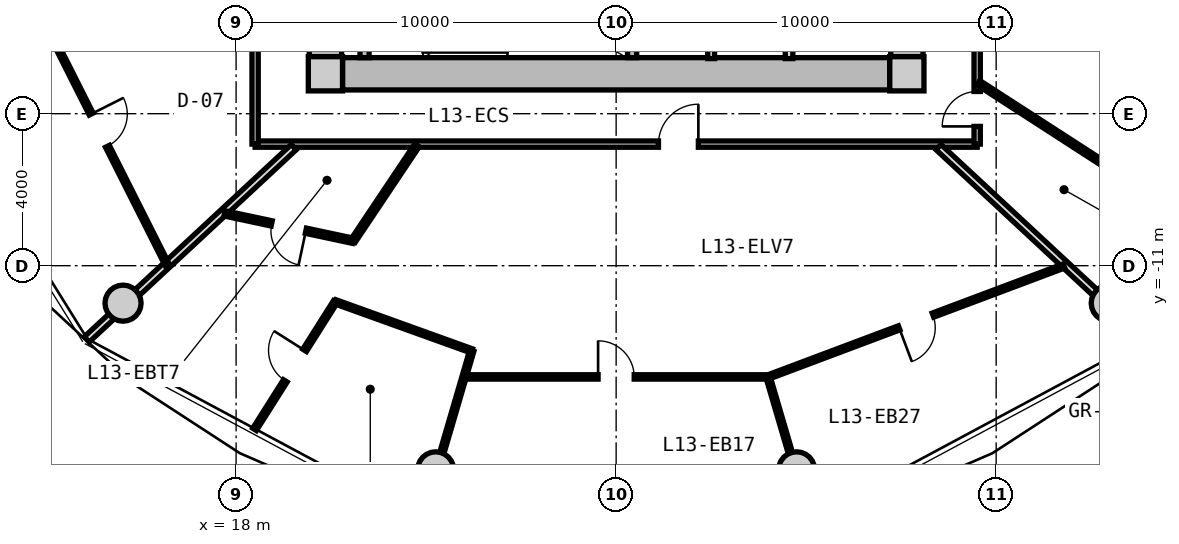
"""IFC4 building model, lengths in metres.
Left out: names, types, materials, properties, quantities, classifications, styles, units other than length and angle.
Written with IfcOpenShell. Run it as: python <this file> out.ifc"""

import sys

from ifc_helpers import new_model, si_unit, direction, frame, frame_2d, origin, origin_2d, place, context, subcontext, project, spatial, rectangle, circle, extrude, source, transform, mapped, element, fill, save


model = new_model("IFC4")
c1 = context("Model", 3, precision=1e-05, world=origin(), true_north=direction((0.0, 1.0)))
c2 = subcontext(c1, "Body", "Model", "MODEL_VIEW")
j1 = project(units=[si_unit("LENGTHUNIT", "METRE"), si_unit("PLANEANGLEUNIT", "RADIAN")], contexts=[c1])
p1 = place(None, origin())
s1 = spatial("IfcSite", under=j1, at=p1, CompositionType="ELEMENT")
p2 = place(p1, origin())
s2 = spatial("IfcBuilding", under=s1, at=p2, CompositionType="ELEMENT")
p3 = place(p2, frame((0.0, 0.0, 46.0)))
s3 = spatial("IfcBuildingStorey", under=s2, at=p3, CompositionType="ELEMENT", Elevation=46.0)
m1 = source(origin(), c2, "Body", "SweptSolid", [
    extrude(rectangle(XDim=0.9, YDim=0.9, at=origin_2d()), origin(), (0.0, 0.0, 1.0), 3.05),
])
for number, where, z_axis, x_axis in (
    (1, (20.35, -5.95, 0.0), (0.0, 0.0, 1.0), (1.0, 0.0, 0.0)),
    (2, (35.65, -5.95, 0.0), (0.0, 0.0, 1.0), (1.0, 0.0, 0.0)),
):
    element("IfcColumn", number, at=place(p3, frame(where, z_axis=z_axis, x_axis=x_axis)), inside=s3, PredefinedType="COLUMN", context=c2, shape_type="MappedRepresentation", body=[
        mapped(m1, transform((0.0, 0.0, 0.0), x_axis=(1.0, 0.0, 0.0), y_axis=(0.0, 1.0, 0.0), z_axis=(0.0, 0.0, 1.0), scale=1.0)),
    ])
m2 = source(origin(), c2, "Body", "SweptSolid", [
    extrude(rectangle(XDim=14.4, YDim=0.85, at=frame_2d((7.2, 0.0))), origin(), (0.0, 0.0, 1.0), 2.79),
])
p4 = place(p3, frame((35.2, -5.95, 0.0), z_axis=(0.0, 0.0, 1.0), x_axis=(-1.0, 0.0, 0.0)))
e3 = element("IfcWall", 3, at=p4, inside=s3, PredefinedType="SHEAR", context=c2, shape_type="MappedRepresentation", body=[
    mapped(m2, transform((0.0, 0.0, 0.0), x_axis=(1.0, 0.0, 0.0), y_axis=(0.0, 1.0, 0.0), z_axis=(0.0, 0.0, 1.0), scale=1.0)),
])
m3 = source(origin(), c2, "Body", "SweptSolid", [
    extrude(rectangle(XDim=11.0, YDim=0.85, at=frame_2d((5.5, 0.0))), origin(), (0.0, 0.0, 1.0), 2.79),
])
p5 = place(p3, frame((20.35, -5.5, 0.0), z_axis=(0.0, 0.0, 1.0), x_axis=(0.0, 1.0, 0.0)))
e4 = element("IfcWall", 4, at=p5, inside=s3, PredefinedType="SHEAR", context=c2, shape_type="MappedRepresentation", body=[
    mapped(m3, transform((0.0, 0.0, 0.0), x_axis=(1.0, 0.0, 0.0), y_axis=(0.0, 1.0, 0.0), z_axis=(0.0, 0.0, 1.0), scale=1.0)),
])
p6 = place(p5, frame((3.8, 0.0, 0.0)))
e5 = element("IfcOpeningElement", 5, at=p6, cuts=e4, PredefinedType="OPENING", context=c2, shape_type="SweptSolid", body=[
    extrude(rectangle(XDim=1.2, YDim=2.15, at=frame_2d((0.6, 1.075))), frame((0.0, 0.435, 0.0), z_axis=(0.0, -1.0, 0.0), x_axis=(1.0, 0.0, 0.0)), (0.0, 0.0, 1.0), 0.87),
])
p7 = place(p3, frame((35.65, 5.5, 0.0), z_axis=(0.0, 0.0, 1.0), x_axis=(0.0, -1.0, 0.0)))
e6 = element("IfcWall", 6, at=p7, inside=s3, PredefinedType="SHEAR", context=c2, shape_type="MappedRepresentation", body=[
    mapped(m3, transform((0.0, 0.0, 0.0), x_axis=(1.0, 0.0, 0.0), y_axis=(0.0, 1.0, 0.0), z_axis=(0.0, 0.0, 1.0), scale=1.0)),
])
p8 = place(p7, frame((5.65, 0.0, 0.0)))
e7 = element("IfcOpeningElement", 7, at=p8, cuts=e6, PredefinedType="OPENING", context=c2, shape_type="SweptSolid", body=[
    extrude(rectangle(XDim=1.2, YDim=2.15, at=frame_2d((0.6, 1.075))), frame((0.0, 0.435, 0.0), z_axis=(0.0, -1.0, 0.0), x_axis=(1.0, 0.0, 0.0)), (0.0, 0.0, 1.0), 0.87),
])
m4 = source(origin(), c2, "Body", "SweptSolid", [
    extrude(circle(Radius=0.475, at=origin_2d()), origin(), (0.0, 0.0, 1.0), 3.05),
])
for number, where, z_axis, x_axis in (
    (8, (15.025, -11.985, 0.0), (0.0, 0.0, 1.0), (1.0, 0.0, 0.0)),
    (9, (23.251, -16.373, 0.0), (0.0, 0.0, 1.0), (1.0, 0.0, 0.0)),
    (10, (32.749, -16.373, 0.0), (0.0, 0.0, 1.0), (1.0, 0.0, 0.0)),
    (11, (40.975, -11.985, 0.0), (0.0, 0.0, 1.0), (1.0, 0.0, 0.0)),
):
    element("IfcColumn", number, at=place(p3, frame(where, z_axis=z_axis, x_axis=x_axis)), inside=s3, PredefinedType="COLUMN", context=c2, shape_type="MappedRepresentation", body=[
        mapped(m4, transform((0.0, 0.0, 0.0), x_axis=(1.0, 0.0, 0.0), y_axis=(0.0, 1.0, 0.0), z_axis=(0.0, 0.0, 1.0), scale=1.0)),
    ])
m5 = source(origin(), c2, "Body", "SweptSolid", [
    extrude(rectangle(XDim=3.075, YDim=0.24, at=frame_2d((1.538, 0.0))), origin(), (0.0, 0.0, 1.0), 2.79),
])
for number, where, z_axis, x_axis in (
    (12, (21.38, -5.525, 0.0), (0.0, 0.0, 1.0), (0.0, 1.0, 0.0)),
    (13, (28.42, -5.525, 0.0), (0.0, 0.0, 1.0), (0.0, 1.0, 0.0)),
):
    element("IfcWall", number, at=place(p3, frame(where, z_axis=z_axis, x_axis=x_axis)), inside=s3, PredefinedType="PARTITIONING", context=c2, shape_type="MappedRepresentation", body=[
        mapped(m5, transform((0.0, 0.0, 0.0), x_axis=(1.0, 0.0, 0.0), y_axis=(0.0, 1.0, 0.0), z_axis=(0.0, 0.0, 1.0), scale=1.0)),
    ])
m6 = source(origin(), c2, "Body", "SweptSolid", [
    extrude(rectangle(XDim=3.8, YDim=0.2, at=frame_2d((1.9, 0.0))), origin(), (0.0, 0.0, 1.0), 2.775),
])
p9 = place(p3, frame((32.55, -5.55, 0.0), z_axis=(0.0, 0.0, 1.0), x_axis=(0.0, 1.0, 0.0)))
e14 = element("IfcWall", 14, at=p9, inside=s3, PredefinedType="PARTITIONING", context=c2, shape_type="MappedRepresentation", body=[
    mapped(m6, transform((0.0, 0.0, 0.0), x_axis=(1.0, 0.0, 0.0), y_axis=(0.0, 1.0, 0.0), z_axis=(0.0, 0.0, 1.0), scale=1.0)),
])
m7 = source(origin(), c2, "Body", "SweptSolid", [
    extrude(rectangle(XDim=3.22, YDim=0.18, at=frame_2d((1.61, 0.0))), origin(), (0.0, 0.0, 1.0), 2.775),
])
p10 = place(p3, frame((30.5, -5.55, 0.0), z_axis=(0.0, 0.0, 1.0), x_axis=(0.0, 1.0, 0.0)))
e15 = element("IfcWall", 15, at=p10, inside=s3, PredefinedType="PARTITIONING", context=c2, shape_type="MappedRepresentation", body=[
    mapped(m7, transform((0.0, 0.0, 0.0), x_axis=(1.0, 0.0, 0.0), y_axis=(0.0, 1.0, 0.0), z_axis=(0.0, 0.0, 1.0), scale=1.0)),
])
m8 = source(origin(), c2, "Body", "SweptSolid", [
    extrude(rectangle(XDim=19.0, YDim=0.165, at=frame_2d((9.5, 0.0))), origin(), (0.0, 0.0, 1.0), 2.775),
])
p11 = place(p3, frame((37.5, -7.8, 0.0), z_axis=(0.0, 0.0, 1.0), x_axis=(-1.0, 0.0, 0.0)))
e16 = element("IfcWall", 16, at=p11, inside=s3, PredefinedType="PARTITIONING", context=c2, shape_type="MappedRepresentation", body=[
    mapped(m8, transform((0.0, 0.0, 0.0), x_axis=(1.0, 0.0, 0.0), y_axis=(0.0, 1.0, 0.0), z_axis=(0.0, 0.0, 1.0), scale=1.0)),
])
p12 = place(p11, frame((7.336, 0.0, 0.0)))
e17 = element("IfcOpeningElement", 17, at=p12, cuts=e16, PredefinedType="OPENING", context=c2, shape_type="SweptSolid", body=[
    extrude(rectangle(XDim=1.05, YDim=2.15, at=frame_2d((0.525, 1.075))), frame((0.0, 0.093, 0.0), z_axis=(0.0, -1.0, 0.0), x_axis=(1.0, 0.0, 0.0)), (0.0, 0.0, 1.0), 0.185),
])
m9 = source(origin(), c2, "Body", "SweptSolid", [
    extrude(rectangle(XDim=15.6, YDim=0.165, at=frame_2d((7.8, 0.0))), origin(), (0.0, 0.0, 1.0), 2.775),
])
p13 = place(p3, frame((18.5, -7.8, 0.0), z_axis=(0.0, 0.0, 1.0), x_axis=(0.0, 1.0, 0.0)))
e18 = element("IfcWall", 18, at=p13, inside=s3, PredefinedType="PARTITIONING", context=c2, shape_type="MappedRepresentation", body=[
    mapped(m9, transform((0.0, 0.0, 0.0), x_axis=(1.0, 0.0, 0.0), y_axis=(0.0, 1.0, 0.0), z_axis=(0.0, 0.0, 1.0), scale=1.0)),
])
p14 = place(p13, frame((7.275, 0.0, 0.0)))
e19 = element("IfcOpeningElement", 19, at=p14, cuts=e18, PredefinedType="OPENING", context=c2, shape_type="SweptSolid", body=[
    extrude(rectangle(XDim=1.05, YDim=2.15, at=frame_2d((0.525, 1.075))), frame((0.0, 0.093, 0.0), z_axis=(0.0, -1.0, 0.0), x_axis=(1.0, 0.0, 0.0)), (0.0, 0.0, 1.0), 0.185),
])
p15 = place(p3, frame((37.5, 7.8, 0.0), z_axis=(0.0, 0.0, 1.0), x_axis=(0.0, -1.0, 0.0)))
e20 = element("IfcWall", 20, at=p15, inside=s3, PredefinedType="PARTITIONING", context=c2, shape_type="MappedRepresentation", body=[
    mapped(m9, transform((0.0, 0.0, 0.0), x_axis=(1.0, 0.0, 0.0), y_axis=(0.0, 1.0, 0.0), z_axis=(0.0, 0.0, 1.0), scale=1.0)),
])
p16 = place(p15, frame((14.215, 0.0, 0.0)))
e21 = element("IfcOpeningElement", 21, at=p16, cuts=e20, PredefinedType="OPENING", context=c2, shape_type="SweptSolid", body=[
    extrude(rectangle(XDim=0.92, YDim=2.1, at=frame_2d((0.46, 1.05))), frame((0.0, 0.093, 0.0), z_axis=(0.0, -1.0, 0.0), x_axis=(1.0, 0.0, 0.0)), (0.0, 0.0, 1.0), 0.185),
])
p17 = place(p15, frame((11.609, 0.0, 0.0)))
e22 = element("IfcOpeningElement", 22, at=p17, cuts=e20, PredefinedType="OPENING", context=c2, shape_type="SweptSolid", body=[
    extrude(rectangle(XDim=0.92, YDim=2.1, at=frame_2d((0.46, 1.05))), frame((0.0, 0.093, 0.0), z_axis=(0.0, -1.0, 0.0), x_axis=(1.0, 0.0, 0.0)), (0.0, 0.0, 1.0), 0.185),
])
p18 = place(p15, frame((7.175, 0.0, 0.0)))
e23 = element("IfcOpeningElement", 23, at=p18, cuts=e20, PredefinedType="OPENING", context=c2, shape_type="SweptSolid", body=[
    extrude(rectangle(XDim=1.25, YDim=2.2, at=frame_2d((0.625, 1.1))), frame((0.0, 0.093, 0.0), z_axis=(0.0, -1.0, 0.0), x_axis=(1.0, 0.0, 0.0)), (0.0, 0.0, 1.0), 0.185),
])
m10 = source(origin(), c2, "Body", "SweptSolid", [
    extrude(rectangle(XDim=7.435, YDim=0.19, at=frame_2d((3.717, 0.0))), origin(), (0.0, 0.0, 1.0), 2.225),
])
p19 = place(p3, frame((19.517, -7.88, 0.0), z_axis=(0.0, 0.0, 1.0), x_axis=(-0.732651956848, -0.680603489652, 0.0)))
e24 = element("IfcWall", 24, at=p19, inside=s3, PredefinedType="PARTITIONING", context=c2, shape_type="MappedRepresentation", body=[
    mapped(m10, transform((0.0, 0.0, 0.0), x_axis=(1.0, 0.0, 0.0), y_axis=(0.0, 1.0, 0.0), z_axis=(0.0, 0.0, 1.0), scale=1.0)),
])
m11 = source(origin(), c2, "Body", "SweptSolid", [
    extrude(rectangle(XDim=8.018, YDim=0.115, at=frame_2d((4.009, 0.0))), origin(), (0.0, 0.0, 1.0), 2.775),
])
p20 = place(p3, frame((12.596, -3.854, 0.0), z_axis=(0.0, 0.0, 1.0), x_axis=(0.450134355233, -0.89296084026, 0.0)))
e25 = element("IfcWall", 25, at=p20, inside=s3, PredefinedType="PARTITIONING", context=c2, shape_type="MappedRepresentation", body=[
    mapped(m11, transform((0.0, 0.0, 0.0), x_axis=(1.0, 0.0, 0.0), y_axis=(0.0, 1.0, 0.0), z_axis=(0.0, 0.0, 1.0), scale=1.0)),
])
p21 = place(p20, frame((3.534, 0.0, 0.0)))
e26 = element("IfcOpeningElement", 26, at=p21, cuts=e25, PredefinedType="OPENING", context=c2, shape_type="SweptSolid", body=[
    extrude(rectangle(XDim=0.95, YDim=2.1, at=frame_2d((0.475, 1.05))), frame((0.0, 0.067, 0.0), z_axis=(0.0, -1.0, 0.0), x_axis=(1.0, 0.0, 0.0)), (0.0, 0.0, 1.0), 0.135),
])
p22 = place(p3, frame((36.483, -7.88, 0.0), z_axis=(0.0, 0.0, 1.0), x_axis=(0.732651956848, -0.680603489652, 0.0)))
e27 = element("IfcWall", 27, at=p22, inside=s3, PredefinedType="PARTITIONING", context=c2, shape_type="MappedRepresentation", body=[
    mapped(m10, transform((0.0, 0.0, 0.0), x_axis=(1.0, 0.0, 0.0), y_axis=(0.0, 1.0, 0.0), z_axis=(0.0, 0.0, 1.0), scale=1.0)),
])
m12 = source(origin(), c2, "Body", "SweptSolid", [
    extrude(rectangle(XDim=7.993, YDim=0.115, at=frame_2d((3.996, 0.0))), origin(), (0.0, 0.0, 1.0), 2.775),
])
p23 = place(p3, frame((24.004, -13.927, 0.0), z_axis=(0.0, 0.0, 1.0), x_axis=(1.0, 0.0, 0.0)))
e28 = element("IfcWall", 28, at=p23, inside=s3, PredefinedType="PARTITIONING", context=c2, shape_type="MappedRepresentation", body=[
    mapped(m12, transform((0.0, 0.0, 0.0), x_axis=(1.0, 0.0, 0.0), y_axis=(0.0, 1.0, 0.0), z_axis=(0.0, 0.0, 1.0), scale=1.0)),
])
p24 = place(p23, frame((3.521, 0.0, 0.0)))
e29 = element("IfcOpeningElement", 29, at=p24, cuts=e28, PredefinedType="OPENING", context=c2, shape_type="SweptSolid", body=[
    extrude(rectangle(XDim=0.95, YDim=2.1, at=frame_2d((0.475, 1.05))), frame((0.0, 0.067, 0.0), z_axis=(0.0, -1.0, 0.0), x_axis=(1.0, 0.0, 0.0)), (0.0, 0.0, 1.0), 0.135),
])
m13 = source(origin(), c2, "Body", "SweptSolid", [
    extrude(rectangle(XDim=4.625, YDim=0.115, at=frame_2d((2.312, 0.0))), origin(), (0.0, 0.0, 1.0), 2.225),
])
p25 = place(p3, frame((24.201, -13.239, 0.0), z_axis=(0.0, 0.0, 1.0), x_axis=(-0.2810742844, -0.959686014616, 0.0)))
e30 = element("IfcWall", 30, at=p25, inside=s3, PredefinedType="PARTITIONING", context=c2, shape_type="MappedRepresentation", body=[
    mapped(m13, transform((0.0, 0.0, 0.0), x_axis=(1.0, 0.0, 0.0), y_axis=(0.0, 1.0, 0.0), z_axis=(0.0, 0.0, 1.0), scale=1.0)),
])
m14 = source(origin(), c2, "Body", "SweptSolid", [
    extrude(rectangle(XDim=8.32, YDim=0.115, at=frame_2d((4.16, 0.0))), origin(), (0.0, 0.0, 1.0), 2.775),
])
p26 = place(p3, frame((31.997, -13.93, 0.0), z_axis=(0.0, 0.0, 1.0), x_axis=(0.936180763098, 0.351518959382, 0.0)))
e31 = element("IfcWall", 31, at=p26, inside=s3, PredefinedType="PARTITIONING", context=c2, shape_type="MappedRepresentation", body=[
    mapped(m14, transform((0.0, 0.0, 0.0), x_axis=(1.0, 0.0, 0.0), y_axis=(0.0, 1.0, 0.0), z_axis=(0.0, 0.0, 1.0), scale=1.0)),
])
p27 = place(p26, frame((3.685, 0.0, 0.0)))
e32 = element("IfcOpeningElement", 32, at=p27, cuts=e31, PredefinedType="OPENING", context=c2, shape_type="SweptSolid", body=[
    extrude(rectangle(XDim=0.95, YDim=2.1, at=frame_2d((0.475, 1.05))), frame((0.0, 0.067, 0.0), z_axis=(0.0, -1.0, 0.0), x_axis=(1.0, 0.0, 0.0)), (0.0, 0.0, 1.0), 0.135),
])
m15 = source(origin(), c2, "Body", "SweptSolid", [
    extrude(rectangle(XDim=3.905, YDim=0.115, at=frame_2d((1.952, 0.0))), origin(), (0.0, 0.0, 1.0), 2.225),
])
p28 = place(p3, frame((31.997, -13.93, 0.0), z_axis=(0.0, 0.0, 1.0), x_axis=(0.282037692958, -0.959403324859, 0.0)))
e33 = element("IfcWall", 33, at=p28, inside=s3, PredefinedType="PARTITIONING", context=c2, shape_type="MappedRepresentation", body=[
    mapped(m15, transform((0.0, 0.0, 0.0), x_axis=(1.0, 0.0, 0.0), y_axis=(0.0, 1.0, 0.0), z_axis=(0.0, 0.0, 1.0), scale=1.0)),
])
m16 = source(origin(), c2, "Body", "SweptSolid", [
    extrude(rectangle(XDim=3.025, YDim=0.14, at=frame_2d((1.513, 0.0))), origin(), (0.0, 0.0, 1.0), 2.775),
])
p29 = place(p3, frame((22.76, -7.83, 0.0), z_axis=(0.0, 0.0, 1.0), x_axis=(-0.556189165904, -0.831055721195, 0.0)))
e34 = element("IfcWall", 34, at=p29, inside=s3, PredefinedType="PARTITIONING", context=c2, shape_type="MappedRepresentation", body=[
    mapped(m16, transform((0.0, 0.0, 0.0), x_axis=(1.0, 0.0, 0.0), y_axis=(0.0, 1.0, 0.0), z_axis=(0.0, 0.0, 1.0), scale=1.0)),
])
m17 = source(origin(), c2, "Body", "SweptSolid", [
    extrude(rectangle(XDim=3.459, YDim=0.14, at=frame_2d((1.729, 0.0))), origin(), (0.0, 0.0, 1.0), 2.775),
])
p30 = place(p3, frame((21.078, -10.344, 0.0), z_axis=(0.0, 0.0, 1.0), x_axis=(-0.978006468578, 0.208574560815, 0.0)))
e35 = element("IfcWall", 35, at=p30, inside=s3, PredefinedType="PARTITIONING", context=c2, shape_type="MappedRepresentation", body=[
    mapped(m17, transform((0.0, 0.0, 0.0), x_axis=(1.0, 0.0, 0.0), y_axis=(0.0, 1.0, 0.0), z_axis=(0.0, 0.0, 1.0), scale=1.0)),
])
p31 = place(p30, frame((1.27, 0.0, 0.0)))
e36 = element("IfcOpeningElement", 36, at=p31, cuts=e35, PredefinedType="OPENING", context=c2, shape_type="SweptSolid", body=[
    extrude(rectangle(XDim=0.92, YDim=2.1, at=frame_2d((0.46, 1.05))), frame((0.0, 0.08, 0.0), z_axis=(0.0, -1.0, 0.0), x_axis=(1.0, 0.0, 0.0)), (0.0, 0.0, 1.0), 0.16),
])
m18 = source(origin(), c2, "Body", "SweptSolid", [
    extrude(rectangle(XDim=3.974, YDim=0.115, at=frame_2d((1.987, 0.0))), origin(), (0.0, 0.0, 1.0), 2.775),
])
p32 = place(p3, frame((20.611, -11.95, 0.0), z_axis=(0.0, 0.0, 1.0), x_axis=(-0.534810918023, -0.844971764003, 0.0)))
e37 = element("IfcWall", 37, at=p32, inside=s3, PredefinedType="PARTITIONING", context=c2, shape_type="MappedRepresentation", body=[
    mapped(m18, transform((0.0, 0.0, 0.0), x_axis=(1.0, 0.0, 0.0), y_axis=(0.0, 1.0, 0.0), z_axis=(0.0, 0.0, 1.0), scale=1.0)),
])
p33 = place(p32, frame((1.512, 0.0, 0.0)))
e38 = element("IfcOpeningElement", 38, at=p33, cuts=e37, PredefinedType="OPENING", context=c2, shape_type="SweptSolid", body=[
    extrude(rectangle(XDim=0.95, YDim=2.1, at=frame_2d((0.475, 1.05))), frame((0.0, 0.067, 0.0), z_axis=(0.0, -1.0, 0.0), x_axis=(1.0, 0.0, 0.0)), (0.0, 0.0, 1.0), 0.135),
])
m19 = source(origin(), c2, "Body", "SweptSolid", [
    extrude(rectangle(XDim=3.814, YDim=0.115, at=frame_2d((1.907, 0.0))), origin(), (0.0, 0.0, 1.0), 2.775),
])
p34 = place(p3, frame((20.611, -11.95, 0.0), z_axis=(0.0, 0.0, 1.0), x_axis=(0.940935542004, -0.338585743637, 0.0)))
e39 = element("IfcWall", 39, at=p34, inside=s3, PredefinedType="PARTITIONING", context=c2, shape_type="MappedRepresentation", body=[
    mapped(m19, transform((0.0, 0.0, 0.0), x_axis=(1.0, 0.0, 0.0), y_axis=(0.0, 1.0, 0.0), z_axis=(0.0, 0.0, 1.0), scale=1.0)),
])
m20 = source(origin(), c2, "Body", "SweptSolid", [
    extrude(rectangle(XDim=7.304, YDim=0.14, at=frame_2d((3.652, 0.0))), origin(), (0.0, 0.0, 1.0), 2.775),
])
p35 = place(p3, frame((37.53, -6.185, 0.0), z_axis=(0.0, 0.0, 1.0), x_axis=(0.83973870965, -0.54299069929, 0.0)))
e40 = element("IfcWall", 40, at=p35, inside=s3, PredefinedType="PARTITIONING", context=c2, shape_type="MappedRepresentation", body=[
    mapped(m20, transform((0.0, 0.0, 0.0), x_axis=(1.0, 0.0, 0.0), y_axis=(0.0, 1.0, 0.0), z_axis=(0.0, 0.0, 1.0), scale=1.0)),
])
m21 = source(origin(), c2, "Body", "SweptSolid", [
    extrude(rectangle(XDim=0.95, YDim=2.1, at=frame_2d((0.475, 1.05))), frame((0.0, 0.025, 0.0), z_axis=(0.0, -1.0, 0.0), x_axis=(1.0, 0.0, 0.0)), (0.0, 0.0, 1.0), 0.05),
])
p36 = place(p21, origin())
e41 = element("IfcDoor", 41, at=p36, inside=s3, OperationType="SINGLE_SWING_LEFT", PredefinedType="DOOR", context=c2, shape_type="MappedRepresentation", body=[
    mapped(m21, transform((0.0, 0.0, 0.0), x_axis=(1.0, 0.0, 0.0), y_axis=(0.0, 1.0, 0.0), z_axis=(0.0, 0.0, 1.0), scale=1.0)),
])
fill(e26, e41)
m22 = source(origin(), c2, "Body", "SweptSolid", [
    extrude(rectangle(XDim=1.05, YDim=2.15, at=frame_2d((0.525, 1.075))), frame((0.0, 0.025, 0.0), z_axis=(0.0, -1.0, 0.0), x_axis=(1.0, 0.0, 0.0)), (0.0, 0.0, 1.0), 0.05),
])
p37 = place(p12, frame((1.05, 0.0, 0.0), z_axis=(0.0, 0.0, 1.0), x_axis=(-1.0, 0.0, 0.0)))
e42 = element("IfcDoor", 42, at=p37, inside=s3, OperationType="SINGLE_SWING_RIGHT", PredefinedType="DOOR", context=c2, shape_type="MappedRepresentation", body=[
    mapped(m22, transform((0.0, 0.0, 0.0), x_axis=(1.0, 0.0, 0.0), y_axis=(0.0, 1.0, 0.0), z_axis=(0.0, 0.0, 1.0), scale=1.0)),
])
fill(e17, e42)
m23 = source(origin(), c2, "Body", "SweptSolid", [
    extrude(rectangle(XDim=0.92, YDim=2.1, at=frame_2d((0.46, 1.05))), frame((0.0, 0.025, 0.0), z_axis=(0.0, -1.0, 0.0), x_axis=(1.0, 0.0, 0.0)), (0.0, 0.0, 1.0), 0.05),
])
p38 = place(p31, origin())
e43 = element("IfcDoor", 43, at=p38, inside=s3, OperationType="SINGLE_SWING_LEFT", PredefinedType="DOOR", context=c2, shape_type="MappedRepresentation", body=[
    mapped(m23, transform((0.0, 0.0, 0.0), x_axis=(1.0, 0.0, 0.0), y_axis=(0.0, 1.0, 0.0), z_axis=(0.0, 0.0, 1.0), scale=1.0)),
])
fill(e36, e43)
p39 = place(p33, frame((0.95, 0.0, 0.0), z_axis=(0.0, 0.0, 1.0), x_axis=(-1.0, 0.0, 0.0)))
e44 = element("IfcDoor", 44, at=p39, inside=s3, OperationType="SINGLE_SWING_RIGHT", PredefinedType="DOOR", context=c2, shape_type="MappedRepresentation", body=[
    mapped(m21, transform((0.0, 0.0, 0.0), x_axis=(1.0, 0.0, 0.0), y_axis=(0.0, 1.0, 0.0), z_axis=(0.0, 0.0, 1.0), scale=1.0)),
])
fill(e38, e44)
p40 = place(p24, origin())
e45 = element("IfcDoor", 45, at=p40, inside=s3, OperationType="SINGLE_SWING_LEFT", PredefinedType="DOOR", context=c2, shape_type="MappedRepresentation", body=[
    mapped(m21, transform((0.0, 0.0, 0.0), x_axis=(1.0, 0.0, 0.0), y_axis=(0.0, 1.0, 0.0), z_axis=(0.0, 0.0, 1.0), scale=1.0)),
])
fill(e29, e45)
p41 = place(p27, frame((0.95, 0.0, 0.0), z_axis=(0.0, 0.0, 1.0), x_axis=(-1.0, 0.0, 0.0)))
e46 = element("IfcDoor", 46, at=p41, inside=s3, OperationType="SINGLE_SWING_RIGHT", PredefinedType="DOOR", context=c2, shape_type="MappedRepresentation", body=[
    mapped(m21, transform((0.0, 0.0, 0.0), x_axis=(1.0, 0.0, 0.0), y_axis=(0.0, 1.0, 0.0), z_axis=(0.0, 0.0, 1.0), scale=1.0)),
])
fill(e32, e46)
p42 = place(p16, frame((0.92, 0.0, 0.0), z_axis=(0.0, 0.0, 1.0), x_axis=(-1.0, 0.0, 0.0)))
e47 = element("IfcDoor", 47, at=p42, inside=s3, OperationType="SINGLE_SWING_LEFT", PredefinedType="DOOR", context=c2, shape_type="MappedRepresentation", body=[
    mapped(m23, transform((0.0, 0.0, 0.0), x_axis=(1.0, 0.0, 0.0), y_axis=(0.0, 1.0, 0.0), z_axis=(0.0, 0.0, 1.0), scale=1.0)),
])
fill(e21, e47)
save(model, sys.argv[1])
